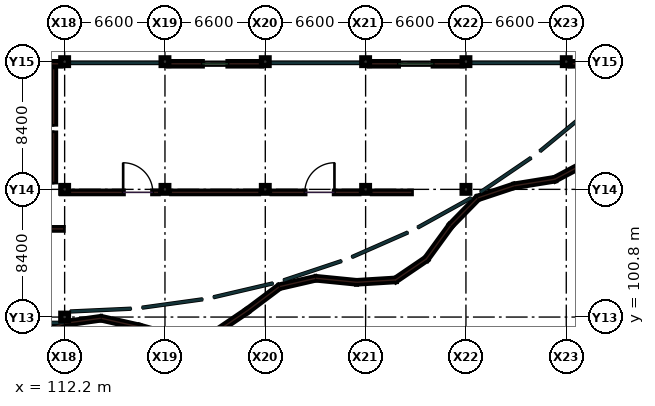
"""IFC4 building model, lengths in metres.
Left out: names, types, materials, properties, quantities, classifications, styles, units other than length and angle.
Written with IfcOpenShell. Run it as: python <this file> out.ifc"""

import sys

from ifc_helpers import new_model, si_unit, direction, frame, frame_2d, origin, origin_2d, place, context, subcontext, project, spatial, rectangle, extrude, element, fill, save


model = new_model("IFC4")
c1 = context("Model", 3, precision=1e-05, world=origin(), true_north=direction((0.0, 1.0)))
c2 = subcontext(c1, "Body", "Model", "MODEL_VIEW")
j1 = project(units=[si_unit("LENGTHUNIT", "METRE"), si_unit("PLANEANGLEUNIT", "RADIAN")], contexts=[c1])
p1 = place(None, origin())
s1 = spatial("IfcSite", under=j1, at=p1, CompositionType="ELEMENT")
p2 = place(p1, origin())
s2 = spatial("IfcBuilding", under=s1, at=p2, CompositionType="ELEMENT")
p3 = place(p2, frame((0.0, 0.0, 22.8)))
s3 = spatial("IfcBuildingStorey", under=s2, at=p3, CompositionType="ELEMENT", Elevation=22.8)
for number, where, z_axis, x_axis in (
    (1, (112.2, 100.8, 0.0), (0.0, 0.0, 1.0), (1.0, 0.0, 0.0)),
    (2, (112.2, 109.2, 0.0), (0.0, 0.0, 1.0), (1.0, 0.0, 0.0)),
    (3, (112.2, 117.6, 0.0), (0.0, 0.0, 1.0), (1.0, 0.0, 0.0)),
    (4, (118.8, 109.2, 0.0), (0.0, 0.0, 1.0), (1.0, 0.0, 0.0)),
    (5, (118.8, 117.6, 0.0), (0.0, 0.0, 1.0), (1.0, 0.0, 0.0)),
    (6, (125.4, 109.2, 0.0), (0.0, 0.0, 1.0), (1.0, 0.0, 0.0)),
    (7, (125.4, 117.6, 0.0), (0.0, 0.0, 1.0), (1.0, 0.0, 0.0)),
    (8, (132.0, 109.2, 0.0), (0.0, 0.0, 1.0), (1.0, 0.0, 0.0)),
    (9, (132.0, 117.6, 0.0), (0.0, 0.0, 1.0), (1.0, 0.0, 0.0)),
    (10, (138.6, 109.2, 0.0), (0.0, 0.0, 1.0), (1.0, 0.0, 0.0)),
    (11, (138.6, 117.6, 0.0), (0.0, 0.0, 1.0), (1.0, 0.0, 0.0)),
    (12, (145.2, 117.6, 0.0), (0.0, 0.0, 1.0), (1.0, 0.0, 0.0)),
):
    element("IfcColumn", number, at=place(p3, frame(where, z_axis=z_axis, x_axis=x_axis)), inside=s3, PredefinedType="COLUMN", context=c2, shape_type="SweptSolid", body=[
        extrude(rectangle(XDim=0.5, YDim=0.5, at=origin_2d()), origin(), (0.0, 0.0, 1.0), 4.2),
    ])
p4 = place(p3, frame((112.0, 109.0, 0.0), z_axis=(0.0, 0.0, 1.0), x_axis=(1.0, 0.0, 0.0)))
e13 = element("IfcWall", 13, at=p4, inside=s3, PredefinedType="PARTITIONING", context=c2, shape_type="SweptSolid", body=[
    extrude(rectangle(XDim=6.35, YDim=0.16, at=frame_2d((3.175, 0.0))), origin(), (0.0, 0.0, 1.0), 3.195),
])
p5 = place(p4, frame((4.05, 0.0, 0.0)))
e14 = element("IfcOpeningElement", 14, at=p5, cuts=e13, PredefinedType="OPENING", context=c2, shape_type="SweptSolid", body=[
    extrude(rectangle(XDim=1.95, YDim=2.35, at=frame_2d((0.975, 1.175))), frame((0.0, 0.09, 0.0), z_axis=(0.0, -1.0, 0.0), x_axis=(1.0, 0.0, 0.0)), (0.0, 0.0, 1.0), 0.18),
])
p6 = place(p3, frame((119.25, 109.0, 0.0), z_axis=(0.0, 0.0, 1.0), x_axis=(1.0, 0.0, 0.0)))
e15 = element("IfcWall", 15, at=p6, inside=s3, PredefinedType="PARTITIONING", context=c2, shape_type="SweptSolid", body=[
    extrude(rectangle(XDim=5.7, YDim=0.16, at=frame_2d((2.85, 0.0))), origin(), (0.0, 0.0, 1.0), 3.195),
])
p7 = place(p3, frame((125.85, 109.0, 0.0), z_axis=(0.0, 0.0, 1.0), x_axis=(1.0, 0.0, 0.0)))
e16 = element("IfcWall", 16, at=p7, inside=s3, PredefinedType="PARTITIONING", context=c2, shape_type="SweptSolid", body=[
    extrude(rectangle(XDim=5.7, YDim=0.16, at=frame_2d((2.85, 0.0))), origin(), (0.0, 0.0, 1.0), 3.195),
])
p8 = place(p7, frame((2.15, 0.0, 0.0)))
e17 = element("IfcOpeningElement", 17, at=p8, cuts=e16, PredefinedType="OPENING", context=c2, shape_type="SweptSolid", body=[
    extrude(rectangle(XDim=1.95, YDim=2.35, at=frame_2d((0.975, 1.175))), frame((0.0, 0.09, 0.0), z_axis=(0.0, -1.0, 0.0), x_axis=(1.0, 0.0, 0.0)), (0.0, 0.0, 1.0), 0.18),
])
p9 = place(p3, frame((132.45, 109.0, 0.0), z_axis=(0.0, 0.0, 1.0), x_axis=(1.0, 0.0, 0.0)))
e18 = element("IfcWall", 18, at=p9, inside=s3, PredefinedType="PARTITIONING", context=c2, shape_type="SweptSolid", body=[
    extrude(rectangle(XDim=2.55, YDim=0.16, at=frame_2d((1.275, 0.0))), origin(), (0.0, 0.0, 1.0), 3.195),
])
p10 = place(p3, frame((99.2, 106.6, 0.0), z_axis=(0.0, 0.0, 1.0), x_axis=(1.0, 0.0, 0.0)))
e19 = element("IfcWall", 19, at=p10, inside=s3, PredefinedType="PARTITIONING", context=c2, shape_type="SweptSolid", body=[
    extrude(rectangle(XDim=12.9, YDim=0.16, at=frame_2d((6.45, 0.0))), origin(), (0.0, 0.0, 1.0), 3.23),
])
p11 = place(p10, frame((4.2, 0.0, 0.0)))
e20 = element("IfcOpeningElement", 20, at=p11, cuts=e19, PredefinedType="OPENING", context=c2, shape_type="SweptSolid", body=[
    extrude(rectangle(XDim=1.05, YDim=2.15, at=frame_2d((0.525, 1.075))), frame((0.0, 0.09, 0.0), z_axis=(0.0, -1.0, 0.0), x_axis=(1.0, 0.0, 0.0)), (0.0, 0.0, 1.0), 0.18),
])
p12 = place(p3, frame((111.955, 117.46, 0.0), z_axis=(0.0, 0.0, 1.0), x_axis=(-1.0, 0.0, 0.0)))
e21 = element("IfcWall", 21, at=p12, inside=s3, PredefinedType="SOLIDWALL", context=c2, shape_type="SweptSolid", body=[
    extrude(rectangle(XDim=6.11, YDim=0.28, at=frame_2d((3.055, 0.0))), origin(), (0.0, 0.0, 1.0), 3.345),
])
p13 = place(p12, frame((3.25, 0.0, 0.95)))
e22 = element("IfcOpeningElement", 22, at=p13, cuts=e21, PredefinedType="OPENING", context=c2, shape_type="SweptSolid", body=[
    extrude(rectangle(XDim=0.9, YDim=1.4, at=frame_2d((0.45, 0.7))), frame((0.0, 0.15, 0.0), z_axis=(0.0, -1.0, 0.0), x_axis=(1.0, 0.0, 0.0)), (0.0, 0.0, 1.0), 0.3),
])
p14 = place(p3, frame((125.155, 117.46, 0.0), z_axis=(0.0, 0.0, 1.0), x_axis=(-1.0, 0.0, 0.0)))
e23 = element("IfcWall", 23, at=p14, inside=s3, PredefinedType="SOLIDWALL", context=c2, shape_type="SweptSolid", body=[
    extrude(rectangle(XDim=6.11, YDim=0.28, at=frame_2d((3.055, 0.0))), origin(), (0.0, 0.0, 1.0), 3.345),
])
p15 = place(p14, frame((2.205, 0.0, 0.95)))
e24 = element("IfcOpeningElement", 24, at=p15, cuts=e23, PredefinedType="OPENING", context=c2, shape_type="SweptSolid", body=[
    extrude(rectangle(XDim=1.7, YDim=1.95, at=frame_2d((0.85, 0.975))), frame((0.0, 0.15, 0.0), z_axis=(0.0, -1.0, 0.0), x_axis=(1.0, 0.0, 0.0)), (0.0, 0.0, 1.0), 0.3),
])
p16 = place(p3, frame((138.355, 117.46, 0.0), z_axis=(0.0, 0.0, 1.0), x_axis=(-1.0, 0.0, 0.0)))
e25 = element("IfcWall", 25, at=p16, inside=s3, PredefinedType="SOLIDWALL", context=c2, shape_type="SweptSolid", body=[
    extrude(rectangle(XDim=6.11, YDim=0.28, at=frame_2d((3.055, 0.0))), origin(), (0.0, 0.0, 1.0), 3.345),
])
p17 = place(p16, frame((1.905, 0.0, 0.95)))
e26 = element("IfcOpeningElement", 26, at=p17, cuts=e25, PredefinedType="OPENING", context=c2, shape_type="SweptSolid", body=[
    extrude(rectangle(XDim=2.3, YDim=1.95, at=frame_2d((1.15, 0.975))), frame((0.0, 0.15, 0.0), z_axis=(0.0, -1.0, 0.0), x_axis=(1.0, 0.0, 0.0)), (0.0, 0.0, 1.0), 0.3),
])
p18 = place(p3, frame((110.645, 99.84, 0.0), z_axis=(0.0, 0.0, 1.0), x_axis=(0.943560676249, 0.331199713522, 0.0)))
e27 = element("IfcWall", 27, at=p18, inside=s3, PredefinedType="SOLIDWALL", context=c2, shape_type="SweptSolid", body=[
    extrude(rectangle(XDim=1.6, YDim=0.22, at=frame_2d((0.8, 0.0))), origin(), (0.0, 0.0, 1.0), 1.45),
])
p19 = place(p3, frame((112.18, 100.38, 0.0), z_axis=(0.0, 0.0, 1.0), x_axis=(0.990109991905, 0.140293278275, 0.0)))
e28 = element("IfcWall", 28, at=p19, inside=s3, PredefinedType="SOLIDWALL", context=c2, shape_type="SweptSolid", body=[
    extrude(rectangle(XDim=2.424, YDim=0.22, at=frame_2d((1.212, 0.0))), origin(), (0.0, 0.0, 1.0), 1.45),
])
p20 = place(p3, frame((114.63, 100.715, 0.0), z_axis=(0.0, 0.0, 1.0), x_axis=(0.975148981181, -0.221550139926, 0.0)))
e29 = element("IfcWall", 29, at=p20, inside=s3, PredefinedType="SOLIDWALL", context=c2, shape_type="SweptSolid", body=[
    extrude(rectangle(XDim=2.528, YDim=0.22, at=frame_2d((1.264, 0.0))), origin(), (0.0, 0.0, 1.0), 1.45),
])
p21 = place(p3, frame((117.105, 100.155, 0.0), z_axis=(0.0, 0.0, 1.0), x_axis=(0.9631326757, -0.269026855534, 0.0)))
e30 = element("IfcWall", 30, at=p21, inside=s3, PredefinedType="SOLIDWALL", context=c2, shape_type="SweptSolid", body=[
    extrude(rectangle(XDim=2.658, YDim=0.22, at=frame_2d((1.329, 0.0))), origin(), (0.0, 0.0, 1.0), 1.45),
])
p22 = place(p3, frame((122.01, 99.72, 0.0), z_axis=(0.0, 0.0, 1.0), x_axis=(0.82768252605, 0.561196610887, 0.0)))
e31 = element("IfcWall", 31, at=p22, inside=s3, PredefinedType="SOLIDWALL", context=c2, shape_type="SweptSolid", body=[
    extrude(rectangle(XDim=2.664, YDim=0.22, at=frame_2d((1.332, 0.0))), origin(), (0.0, 0.0, 1.0), 1.45),
])
p23 = place(p3, frame((124.21, 101.21, 0.0), z_axis=(0.0, 0.0, 1.0), x_axis=(0.799540270237, 0.600612484277, 0.0)))
e32 = element("IfcWall", 32, at=p23, inside=s3, PredefinedType="SOLIDWALL", context=c2, shape_type="SweptSolid", body=[
    extrude(rectangle(XDim=2.614, YDim=0.22, at=frame_2d((1.307, 0.0))), origin(), (0.0, 0.0, 1.0), 1.45),
])
p24 = place(p3, frame((126.355, 102.805, 0.0), z_axis=(0.0, 0.0, 1.0), x_axis=(0.974389482334, 0.224866931134, 0.0)))
e33 = element("IfcWall", 33, at=p24, inside=s3, PredefinedType="SOLIDWALL", context=c2, shape_type="SweptSolid", body=[
    extrude(rectangle(XDim=2.402, YDim=0.22, at=frame_2d((1.201, 0.0))), origin(), (0.0, 0.0, 1.0), 1.45),
])
p25 = place(p3, frame((128.74, 103.35, 0.0), z_axis=(0.0, 0.0, 1.0), x_axis=(0.995141654496, -0.0984534788, 0.0)))
e34 = element("IfcWall", 34, at=p25, inside=s3, PredefinedType="SOLIDWALL", context=c2, shape_type="SweptSolid", body=[
    extrude(rectangle(XDim=2.693, YDim=0.22, at=frame_2d((1.347, 0.0))), origin(), (0.0, 0.0, 1.0), 1.45),
])
p26 = place(p3, frame((131.395, 103.085, 0.0), z_axis=(0.0, 0.0, 1.0), x_axis=(0.998122422816, 0.061250543439, 0.0)))
e35 = element("IfcWall", 35, at=p26, inside=s3, PredefinedType="SOLIDWALL", context=c2, shape_type="SweptSolid", body=[
    extrude(rectangle(XDim=2.615, YDim=0.22, at=frame_2d((1.307, 0.0))), origin(), (0.0, 0.0, 1.0), 1.45),
])
p27 = place(p3, frame((133.935, 103.22, 0.0), z_axis=(0.0, 0.0, 1.0), x_axis=(0.826787481952, 0.562514408427, 0.0)))
e36 = element("IfcWall", 36, at=p27, inside=s3, PredefinedType="SOLIDWALL", context=c2, shape_type="SweptSolid", body=[
    extrude(rectangle(XDim=2.516, YDim=0.22, at=frame_2d((1.258, 0.0))), origin(), (0.0, 0.0, 1.0), 1.45),
])
p28 = place(p3, frame((135.98, 104.6, 0.0), z_axis=(0.0, 0.0, 1.0), x_axis=(0.588522958724, 0.808480505056, 0.0)))
e37 = element("IfcWall", 37, at=p28, inside=s3, PredefinedType="SOLIDWALL", context=c2, shape_type="SweptSolid", body=[
    extrude(rectangle(XDim=2.727, YDim=0.22, at=frame_2d((1.364, 0.0))), origin(), (0.0, 0.0, 1.0), 1.45),
])
p29 = place(p3, frame((137.6, 106.825, 0.0), z_axis=(0.0, 0.0, 1.0), x_axis=(0.698992065981, 0.715129423038, 0.0)))
e38 = element("IfcWall", 38, at=p29, inside=s3, PredefinedType="SOLIDWALL", context=c2, shape_type="SweptSolid", body=[
    extrude(rectangle(XDim=2.496, YDim=0.22, at=frame_2d((1.248, 0.0))), origin(), (0.0, 0.0, 1.0), 1.45),
])
p30 = place(p3, frame((139.4, 108.645, 0.0), z_axis=(0.0, 0.0, 1.0), x_axis=(0.948693132685, 0.316198260583, 0.0)))
e39 = element("IfcWall", 39, at=p30, inside=s3, PredefinedType="SOLIDWALL", context=c2, shape_type="SweptSolid", body=[
    extrude(rectangle(XDim=2.482, YDim=0.22, at=frame_2d((1.241, 0.0))), origin(), (0.0, 0.0, 1.0), 1.45),
])
p31 = place(p3, frame((141.78, 109.435, 0.0), z_axis=(0.0, 0.0, 1.0), x_axis=(0.987219797372, 0.159364587274, 0.0)))
e40 = element("IfcWall", 40, at=p31, inside=s3, PredefinedType="SOLIDWALL", context=c2, shape_type="SweptSolid", body=[
    extrude(rectangle(XDim=2.73, YDim=0.22, at=frame_2d((1.365, 0.0))), origin(), (0.0, 0.0, 1.0), 1.45),
])
p32 = place(p3, frame((144.43, 109.855, 0.0), z_axis=(0.0, 0.0, 1.0), x_axis=(0.883053125192, 0.469273031496, 0.0)))
e41 = element("IfcWall", 41, at=p32, inside=s3, PredefinedType="SOLIDWALL", context=c2, shape_type="SweptSolid", body=[
    extrude(rectangle(XDim=2.525, YDim=0.22, at=frame_2d((1.263, 0.0))), origin(), (0.0, 0.0, 1.0), 1.45),
])
p33 = place(p3, frame((149.93, 117.46, 0.0), z_axis=(0.0, 0.0, 1.0), x_axis=(-1.0, 0.0, 0.0)))
e42 = element("IfcWall", 42, at=p33, inside=s3, PredefinedType="SOLIDWALL", context=c2, shape_type="SweptSolid", body=[
    extrude(rectangle(XDim=4.485, YDim=0.28, at=frame_2d((2.242, 0.0))), origin(), (0.0, 0.0, 1.0), 3.345),
])
p34 = place(p33, frame((1.345, 0.0, 0.95)))
e43 = element("IfcOpeningElement", 43, at=p34, cuts=e42, PredefinedType="OPENING", context=c2, shape_type="SweptSolid", body=[
    extrude(rectangle(XDim=1.8, YDim=1.6, at=frame_2d((0.9, 0.8))), frame((0.0, 0.15, 0.0), z_axis=(0.0, -1.0, 0.0), x_axis=(1.0, 0.0, 0.0)), (0.0, 0.0, 1.0), 0.3),
])
p35 = place(p3, frame((111.475, 109.7, 0.0), z_axis=(0.0, 0.0, 1.0), x_axis=(0.0, 1.0, 0.0)))
e44 = element("IfcWall", 44, at=p35, inside=s3, PredefinedType="SHEAR", context=c2, shape_type="SweptSolid", body=[
    extrude(rectangle(XDim=3.2, YDim=0.25, at=frame_2d((1.6, 0.0))), origin(), (0.0, 0.0, 1.0), 3.96),
])
p36 = place(p3, frame((111.475, 113.5, 0.0), z_axis=(0.0, 0.0, 1.0), x_axis=(0.0, 1.0, 0.0)))
e45 = element("IfcWall", 45, at=p36, inside=s3, PredefinedType="SHEAR", context=c2, shape_type="SweptSolid", body=[
    extrude(rectangle(XDim=3.6, YDim=0.25, at=frame_2d((1.8, 0.0))), origin(), (0.0, 0.0, 1.0), 3.96),
])
p37 = place(p5, origin())
e46 = element("IfcDoor", 46, at=p37, inside=s3, OperationType="SINGLE_SWING_LEFT", PredefinedType="DOOR", context=c2, shape_type="SweptSolid", body=[
    extrude(rectangle(XDim=1.95, YDim=2.35, at=frame_2d((0.975, 1.175))), frame((0.0, 0.025, 0.0), z_axis=(0.0, -1.0, 0.0), x_axis=(1.0, 0.0, 0.0)), (0.0, 0.0, 1.0), 0.05),
])
fill(e14, e46)
p38 = place(p8, origin())
e47 = element("IfcDoor", 47, at=p38, inside=s3, OperationType="SINGLE_SWING_RIGHT", PredefinedType="DOOR", context=c2, shape_type="SweptSolid", body=[
    extrude(rectangle(XDim=1.95, YDim=2.35, at=frame_2d((0.975, 1.175))), frame((0.0, 0.025, 0.0), z_axis=(0.0, -1.0, 0.0), x_axis=(1.0, 0.0, 0.0)), (0.0, 0.0, 1.0), 0.05),
])
fill(e17, e47)
p39 = place(p15, origin())
e48 = element("IfcWindow", 48, at=p39, inside=s3, PartitioningType="SINGLE_PANEL", PredefinedType="WINDOW", context=c2, shape_type="SweptSolid", body=[
    extrude(rectangle(XDim=1.7, YDim=1.95, at=frame_2d((0.85, 0.975))), frame((0.0, 0.03, 0.0), z_axis=(0.0, -1.0, 0.0), x_axis=(1.0, 0.0, 0.0)), (0.0, 0.0, 1.0), 0.06),
])
fill(e24, e48)
p40 = place(p17, origin())
e49 = element("IfcWindow", 49, at=p40, inside=s3, PartitioningType="SINGLE_PANEL", PredefinedType="WINDOW", context=c2, shape_type="SweptSolid", body=[
    extrude(rectangle(XDim=2.3, YDim=1.95, at=frame_2d((1.15, 0.975))), frame((0.0, 0.03, 0.0), z_axis=(0.0, -1.0, 0.0), x_axis=(1.0, 0.0, 0.0)), (0.0, 0.0, 1.0), 0.06),
])
fill(e26, e49)
save(model, sys.argv[1])
